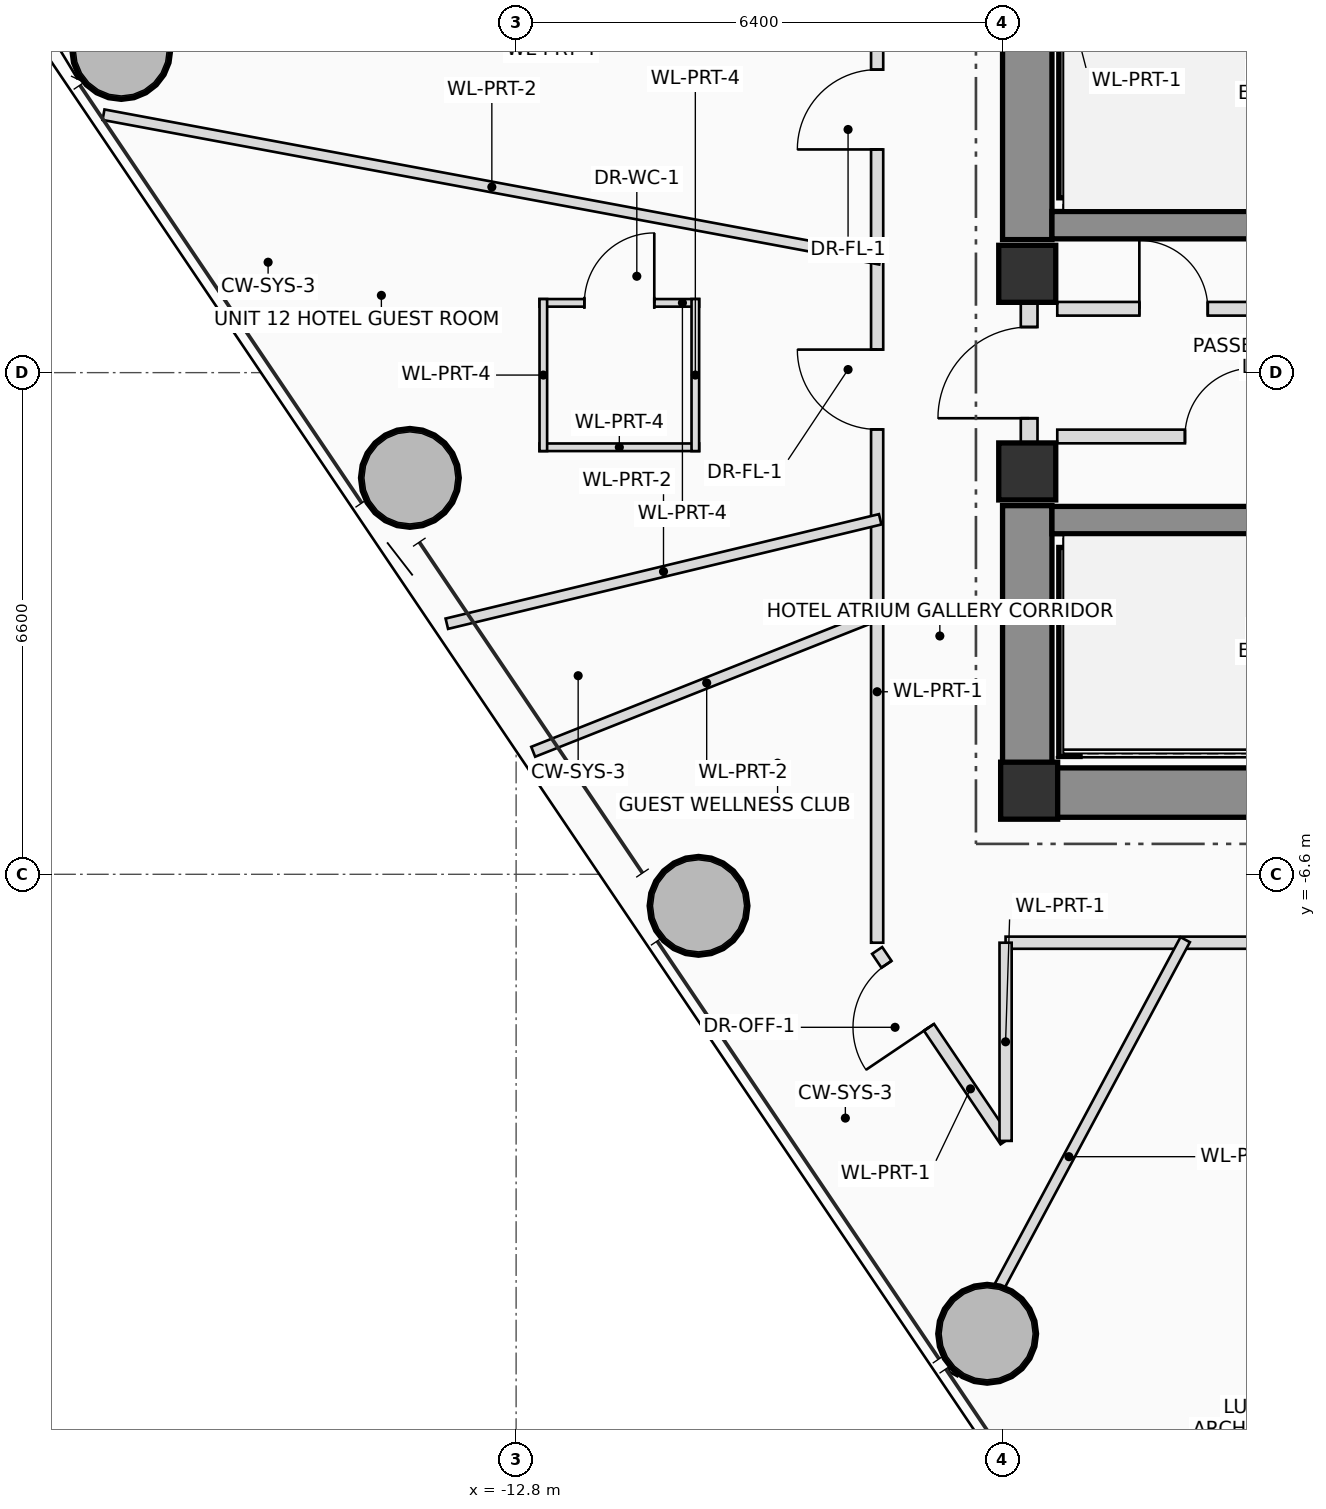
"""IFC4 building model, lengths in metres.
Left out: names, types, materials, properties, quantities, classifications, styles, units other than length and angle.
Written with IfcOpenShell. Run it as: python <this file> out.ifc"""

import sys

from ifc_helpers import new_model, si_unit, direction, frame, frame_2d, origin, origin_2d, place, context, subcontext, project, spatial, rectangle, hollow_circle, extrude, source, transform, mapped, element, fill, save


model = new_model("IFC4")
c1 = context("Model", 3, precision=1e-05, world=origin(), true_north=direction((0.0, 1.0)))
c2 = subcontext(c1, "Body", "Model", "MODEL_VIEW")
j1 = project(units=[si_unit("LENGTHUNIT", "METRE"), si_unit("PLANEANGLEUNIT", "RADIAN")], contexts=[c1])
p1 = place(None, origin())
s1 = spatial("IfcSite", under=j1, at=p1, CompositionType="ELEMENT")
p2 = place(p1, origin())
s2 = spatial("IfcBuilding", under=s1, at=p2, CompositionType="ELEMENT")
p3 = place(p2, frame((0.0, 0.0, 162.2)))
s3 = spatial("IfcBuildingStorey", under=s2, at=p3, CompositionType="ELEMENT", Elevation=162.2)
m1 = source(origin(), c2, "Body", "SweptSolid", [
    extrude(rectangle(XDim=0.75, YDim=0.75, at=origin_2d()), origin(), (0.0, 0.0, 1.0), 3.45),
])
p4 = place(p3, frame((-6.05, -5.5, 0.0), z_axis=(0.0, 0.0, 1.0), x_axis=(1.0, 0.0, 0.0)))
e1 = element("IfcColumn", 1, at=p4, inside=s3, PredefinedType="COLUMN", context=c2, shape_type="MappedRepresentation", body=[
    mapped(m1, transform((0.0, 0.0, 0.0), scale=1.0)),
])
p5 = place(p3, frame((-6.4, -5.525, 0.0), z_axis=(0.0, 0.0, 1.0), x_axis=(1.0, 0.0, 0.0)))
e2 = element("IfcWall", 2, at=p5, inside=s3, PredefinedType="SHEAR", context=c2, shape_type="SweptSolid", body=[
    extrude(rectangle(XDim=12.8, YDim=0.65, at=frame_2d((6.4, 0.0))), origin(), (0.0, 0.0, 1.0), 3.45),
])
p6 = place(p5, frame((8.6, 0.0, 0.0)))
e3 = element("IfcOpeningElement", 3, at=p6, cuts=e2, PredefinedType="OPENING", context=c2, shape_type="SweptSolid", body=[
    extrude(rectangle(XDim=1.2, YDim=2.2, at=frame_2d((0.6, 1.1))), frame((0.0, 0.335, 0.0), z_axis=(0.0, -1.0, 0.0), x_axis=(1.0, 0.0, 0.0)), (0.0, 0.0, 1.0), 0.67),
])
for number, where, z_axis, x_axis in (
    (4, (-6.075, -5.2, 0.0), (0.0, 0.0, 1.0), (0.0, 1.0, 0.0)),
    (5, (-6.075, 1.75, 0.0), (0.0, 0.0, 1.0), (0.0, 1.0, 0.0)),
):
    element("IfcWall", number, at=place(p3, frame(where, z_axis=z_axis, x_axis=x_axis)), inside=s3, PredefinedType="SHEAR", context=c2, shape_type="SweptSolid", body=[
        extrude(rectangle(XDim=3.45, YDim=0.65, at=frame_2d((1.725, 0.0))), origin(), (0.0, 0.0, 1.0), 3.45),
    ])
for number, where, z_axis, x_axis in (
    (6, (-5.75, 1.94, 0.0), (0.0, 0.0, 1.0), (1.0, 0.0, 0.0)),
    (7, (-5.75, -1.94, 0.0), (0.0, 0.0, 1.0), (1.0, 0.0, 0.0)),
):
    element("IfcWall", number, at=place(p3, frame(where, z_axis=z_axis, x_axis=x_axis)), inside=s3, PredefinedType="SHEAR", context=c2, shape_type="SweptSolid", body=[
        extrude(rectangle(XDim=11.5, YDim=0.36, at=frame_2d((5.75, 0.0))), origin(), (0.0, 0.0, 1.0), 3.45),
    ])
for number, where, z_axis, x_axis in (
    (8, (-5.52, 2.3, 0.0), (0.0, 0.0, 1.0), (0.0, 1.0, 0.0)),
    (9, (-5.52, -5.05, 0.0), (0.0, 0.0, 1.0), (0.0, 1.0, 0.0)),
):
    element("IfcWall", number, at=place(p3, frame(where, z_axis=z_axis, x_axis=x_axis)), inside=s3, PredefinedType="SHEAR", context=c2, shape_type="SweptSolid", body=[
        extrude(rectangle(XDim=2.75, YDim=0.28, at=frame_2d((1.375, 0.0))), origin(), (0.0, 0.0, 1.0), 3.45),
    ])
for number, where, z_axis, x_axis in (
    (10, (-6.075, -1.3, 0.0), (0.0, 0.0, 1.0), (1.0, 0.0, 0.0)),
    (11, (-6.075, 1.3, 0.0), (0.0, 0.0, 1.0), (1.0, 0.0, 0.0)),
):
    element("IfcColumn", number, at=place(p3, frame(where, z_axis=z_axis, x_axis=x_axis)), inside=s3, PredefinedType="COLUMN", context=c2, shape_type="MappedRepresentation", body=[
        mapped(m1, transform((0.0, 0.0, 0.0), scale=1.0)),
    ])
m2 = source(origin(), c2, "Body", "SweptSolid", [
    extrude(hollow_circle(Radius=0.65, WallThickness=0.045, at=origin_2d()), origin(), (0.0, 0.0, 1.0), 3.45),
])
for number, where, z_axis, x_axis in (
    (12, (-17.995, 4.245, 0.0), (0.0, 0.0, 1.0), (1.0, 0.0, 0.0)),
    (13, (-14.198, -1.385, 0.0), (0.0, 0.0, 1.0), (1.0, 0.0, 0.0)),
    (14, (-10.4, -7.015, 0.0), (0.0, 0.0, 1.0), (1.0, 0.0, 0.0)),
    (15, (-6.603, -12.645, 0.0), (0.0, 0.0, 1.0), (1.0, 0.0, 0.0)),
):
    element("IfcColumn", number, at=place(p3, frame(where, z_axis=z_axis, x_axis=x_axis)), inside=s3, PredefinedType="COLUMN", context=c2, shape_type="MappedRepresentation", body=[
        mapped(m2, transform((0.0, 0.0, 0.0), scale=1.0)),
    ])
p7 = place(p3, frame((-6.05, -0.95, 0.0), z_axis=(0.0, 0.0, 1.0), x_axis=(0.0, 1.0, 0.0)))
e16 = element("IfcWall", 16, at=p7, inside=s3, PredefinedType="PLUMBINGWALL", context=c2, shape_type="SweptSolid", body=[
    extrude(rectangle(XDim=1.9, YDim=0.22, at=frame_2d((0.95, 0.0))), origin(), (0.0, 0.0, 1.0), 2.23),
])
p8 = place(p7, frame((0.35, 0.0, 0.0)))
e17 = element("IfcOpeningElement", 17, at=p8, cuts=e16, PredefinedType="OPENING", context=c2, shape_type="SweptSolid", body=[
    extrude(rectangle(XDim=1.2, YDim=2.2, at=frame_2d((0.6, 1.1))), frame((0.0, 0.12, 0.0), z_axis=(0.0, -1.0, 0.0), x_axis=(1.0, 0.0, 0.0)), (0.0, 0.0, 1.0), 0.24),
])
p9 = place(p3, frame((-5.68, 0.84, 0.0), z_axis=(0.0, 0.0, 1.0), x_axis=(1.0, 0.0, 0.0)))
e18 = element("IfcWall", 18, at=p9, inside=s3, PredefinedType="PLUMBINGWALL", context=c2, shape_type="SweptSolid", body=[
    extrude(rectangle(XDim=10.26, YDim=0.18, at=frame_2d((5.13, 0.0))), origin(), (0.0, 0.0, 1.0), 3.25),
])
p10 = place(p9, frame((1.08, 0.0, 0.0)))
e19 = element("IfcOpeningElement", 19, at=p10, cuts=e18, PredefinedType="OPENING", context=c2, shape_type="SweptSolid", body=[
    extrude(rectangle(XDim=0.9, YDim=2.05, at=frame_2d((0.45, 1.025))), frame((0.0, 0.1, 0.0), z_axis=(0.0, -1.0, 0.0), x_axis=(1.0, 0.0, 0.0)), (0.0, 0.0, 1.0), 0.2),
])
p11 = place(p9, frame((3.93, 0.0, 0.0)))
e20 = element("IfcOpeningElement", 20, at=p11, cuts=e18, PredefinedType="OPENING", context=c2, shape_type="SweptSolid", body=[
    extrude(rectangle(XDim=1.1, YDim=2.2, at=frame_2d((0.55, 1.1))), frame((0.0, 0.1, 0.0), z_axis=(0.0, -1.0, 0.0), x_axis=(1.0, 0.0, 0.0)), (0.0, 0.0, 1.0), 0.2),
])
p12 = place(p9, frame((5.63, 0.0, 0.0)))
e21 = element("IfcOpeningElement", 21, at=p12, cuts=e18, PredefinedType="OPENING", context=c2, shape_type="SweptSolid", body=[
    extrude(rectangle(XDim=1.1, YDim=2.2, at=frame_2d((0.55, 1.1))), frame((0.0, 0.1, 0.0), z_axis=(0.0, -1.0, 0.0), x_axis=(1.0, 0.0, 0.0)), (0.0, 0.0, 1.0), 0.2),
])
p13 = place(p3, frame((-5.68, -0.84, 0.0), z_axis=(0.0, 0.0, 1.0), x_axis=(1.0, 0.0, 0.0)))
e22 = element("IfcWall", 22, at=p13, inside=s3, PredefinedType="PLUMBINGWALL", context=c2, shape_type="SweptSolid", body=[
    extrude(rectangle(XDim=8.7, YDim=0.18, at=frame_2d((4.35, 0.0))), origin(), (0.0, 0.0, 1.0), 3.25),
])
p14 = place(p13, frame((1.68, 0.0, 0.0)))
e23 = element("IfcOpeningElement", 23, at=p14, cuts=e22, PredefinedType="OPENING", context=c2, shape_type="SweptSolid", body=[
    extrude(rectangle(XDim=0.9, YDim=2.05, at=frame_2d((0.45, 1.025))), frame((0.0, 0.1, 0.0), z_axis=(0.0, -1.0, 0.0), x_axis=(1.0, 0.0, 0.0)), (0.0, 0.0, 1.0), 0.2),
])
p15 = place(p13, frame((3.93, 0.0, 0.0)))
e24 = element("IfcOpeningElement", 24, at=p15, cuts=e22, PredefinedType="OPENING", context=c2, shape_type="SweptSolid", body=[
    extrude(rectangle(XDim=1.1, YDim=2.2, at=frame_2d((0.55, 1.1))), frame((0.0, 0.1, 0.0), z_axis=(0.0, -1.0, 0.0), x_axis=(1.0, 0.0, 0.0)), (0.0, 0.0, 1.0), 0.2),
])
p16 = place(p13, frame((5.63, 0.0, 0.0)))
e25 = element("IfcOpeningElement", 25, at=p16, cuts=e22, PredefinedType="OPENING", context=c2, shape_type="SweptSolid", body=[
    extrude(rectangle(XDim=1.1, YDim=2.2, at=frame_2d((0.55, 1.1))), frame((0.0, 0.1, 0.0), z_axis=(0.0, -1.0, 0.0), x_axis=(1.0, 0.0, 0.0)), (0.0, 0.0, 1.0), 0.2),
])
p17 = place(p3, frame((-12.492, 0.918, 0.0), z_axis=(0.0, 0.0, 1.0), x_axis=(1.0, 0.0, 0.0)))
e26 = element("IfcWall", 26, at=p17, inside=s3, PredefinedType="PARTITIONING", context=c2, shape_type="SweptSolid", body=[
    extrude(rectangle(XDim=2.1, YDim=0.1, at=frame_2d((1.05, 0.0))), origin(), (0.0, 0.0, 1.0), 2.805),
])
p18 = place(p17, frame((0.59, 0.0, 0.0)))
e27 = element("IfcOpeningElement", 27, at=p18, cuts=e26, PredefinedType="OPENING", context=c2, shape_type="SweptSolid", body=[
    extrude(rectangle(XDim=0.92, YDim=2.1, at=frame_2d((0.46, 1.05))), frame((0.0, 0.06, 0.0), z_axis=(0.0, -1.0, 0.0), x_axis=(1.0, 0.0, 0.0)), (0.0, 0.0, 1.0), 0.12),
])
p19 = place(p3, frame((-10.392, -0.982, 0.0), z_axis=(0.0, 0.0, 1.0), x_axis=(-1.0, 0.0, 0.0)))
e28 = element("IfcWall", 28, at=p19, inside=s3, PredefinedType="PARTITIONING", context=c2, shape_type="SweptSolid", body=[
    extrude(rectangle(XDim=2.1, YDim=0.1, at=frame_2d((1.05, 0.0))), origin(), (0.0, 0.0, 1.0), 2.805),
])
for number, where, z_axis, x_axis in (
    (29, (-10.442, 0.968, 0.0), (0.0, 0.0, 1.0), (0.0, -1.0, 0.0)),
    (30, (-12.442, -1.032, 0.0), (0.0, 0.0, 1.0), (0.0, 1.0, 0.0)),
):
    element("IfcWall", number, at=place(p3, frame(where, z_axis=z_axis, x_axis=x_axis)), inside=s3, PredefinedType="PARTITIONING", context=c2, shape_type="SweptSolid", body=[
        extrude(rectangle(XDim=2.0, YDim=0.1, at=frame_2d((1.0, 0.0))), origin(), (0.0, 0.0, 1.0), 3.25),
    ])
p20 = place(p3, frame((-6.36, -10.107, 0.0), z_axis=(0.0, 0.0, 1.0), x_axis=(-0.559166202639, 0.829055581868, 0.0)))
e31 = element("IfcWall", 31, at=p20, inside=s3, PredefinedType="PARTITIONING", context=c2, shape_type="SweptSolid", body=[
    extrude(rectangle(XDim=3.022, YDim=0.16, at=frame_2d((1.511, 0.0))), origin(), (0.0, 0.0, 1.0), 2.605),
])
p21 = place(p20, frame((1.802, 0.0, 0.0)))
e32 = element("IfcOpeningElement", 32, at=p21, cuts=e31, PredefinedType="OPENING", context=c2, shape_type="SweptSolid", body=[
    extrude(rectangle(XDim=1.0, YDim=2.25, at=frame_2d((0.5, 1.125))), frame((0.0, 0.09, 0.0), z_axis=(0.0, -1.0, 0.0), x_axis=(1.0, 0.0, 0.0)), (0.0, 0.0, 1.0), 0.18),
])
p22 = place(p3, frame((-8.05, -7.5, 0.0), z_axis=(0.0, 0.0, 1.0), x_axis=(0.0, 1.0, 0.0)))
e33 = element("IfcWall", 33, at=p22, inside=s3, PredefinedType="PARTITIONING", context=c2, shape_type="SweptSolid", body=[
    extrude(rectangle(XDim=15.0, YDim=0.16, at=frame_2d((7.5, 0.0))), origin(), (0.0, 0.0, 1.0), 2.605),
])
p23 = place(p22, frame((6.753, 0.0, 0.0)))
e34 = element("IfcOpeningElement", 34, at=p23, cuts=e33, PredefinedType="OPENING", context=c2, shape_type="SweptSolid", body=[
    extrude(rectangle(XDim=1.05, YDim=2.2, at=frame_2d((0.525, 1.1))), frame((0.0, 0.09, 0.0), z_axis=(0.0, -1.0, 0.0), x_axis=(1.0, 0.0, 0.0)), (0.0, 0.0, 1.0), 0.18),
])
p24 = place(p22, frame((10.436, 0.0, 0.0)))
e35 = element("IfcOpeningElement", 35, at=p24, cuts=e33, PredefinedType="OPENING", context=c2, shape_type="SweptSolid", body=[
    extrude(rectangle(XDim=1.05, YDim=2.2, at=frame_2d((0.525, 1.1))), frame((0.0, 0.09, 0.0), z_axis=(0.0, -1.0, 0.0), x_axis=(1.0, 0.0, 0.0)), (0.0, 0.0, 1.0), 0.18),
])
p25 = place(p22, frame((13.78, 0.0, 0.0)))
e36 = element("IfcOpeningElement", 36, at=p25, cuts=e33, PredefinedType="OPENING", context=c2, shape_type="SweptSolid", body=[
    extrude(rectangle(XDim=1.0, YDim=2.25, at=frame_2d((0.5, 1.125))), frame((0.0, 0.09, 0.0), z_axis=(0.0, -1.0, 0.0), x_axis=(1.0, 0.0, 0.0)), (0.0, 0.0, 1.0), 0.18),
])
p26 = place(p3, frame((5.25, -7.5, 0.0), z_axis=(0.0, 0.0, 1.0), x_axis=(-1.0, 0.0, 0.0)))
e37 = element("IfcWall", 37, at=p26, inside=s3, PredefinedType="PARTITIONING", context=c2, shape_type="SweptSolid", body=[
    extrude(rectangle(XDim=11.61, YDim=0.16, at=frame_2d((5.805, 0.0))), origin(), (0.0, 0.0, 1.0), 2.605),
])
p27 = place(p26, frame((1.618, 0.0, 0.0)))
e38 = element("IfcOpeningElement", 38, at=p27, cuts=e37, PredefinedType="OPENING", context=c2, shape_type="SweptSolid", body=[
    extrude(rectangle(XDim=1.0, YDim=2.25, at=frame_2d((0.5, 1.125))), frame((0.0, 0.09, 0.0), z_axis=(0.0, -1.0, 0.0), x_axis=(1.0, 0.0, 0.0)), (0.0, 0.0, 1.0), 0.18),
])
p28 = place(p26, frame((6.719, 0.0, 0.0)))
e39 = element("IfcOpeningElement", 39, at=p28, cuts=e37, PredefinedType="OPENING", context=c2, shape_type="SweptSolid", body=[
    extrude(rectangle(XDim=1.0, YDim=2.25, at=frame_2d((0.5, 1.125))), frame((0.0, 0.09, 0.0), z_axis=(0.0, -1.0, 0.0), x_axis=(1.0, 0.0, 0.0)), (0.0, 0.0, 1.0), 0.18),
])
p29 = place(p3, frame((-6.36, -7.5, 0.0), z_axis=(0.0, 0.0, 1.0), x_axis=(0.0, -1.0, 0.0)))
e40 = element("IfcWall", 40, at=p29, inside=s3, PredefinedType="PARTITIONING", context=c2, shape_type="SweptSolid", body=[
    extrude(rectangle(XDim=2.607, YDim=0.16, at=frame_2d((1.304, 0.0))), origin(), (0.0, 0.0, 1.0), 2.605),
])
p30 = place(p3, frame((-8.01, 1.491, 0.0), z_axis=(0.0, 0.0, 1.0), x_axis=(-0.983113838534, 0.182995028575, 0.0)))
e41 = element("IfcWall", 41, at=p30, inside=s3, PredefinedType="PARTITIONING", context=c2, shape_type="SweptSolid", body=[
    extrude(rectangle(XDim=10.394, YDim=0.14, at=frame_2d((5.197, 0.0))), origin(), (0.0, 0.0, 1.0), 2.765),
])
p31 = place(p3, frame((-8.01, -1.93, 0.0), z_axis=(0.0, 0.0, 1.0), x_axis=(-0.972178712373, -0.23424037058, 0.0)))
e42 = element("IfcWall", 42, at=p31, inside=s3, PredefinedType="PARTITIONING", context=c2, shape_type="SweptSolid", body=[
    extrude(rectangle(XDim=5.865, YDim=0.14, at=frame_2d((2.932, 0.0))), origin(), (0.0, 0.0, 1.0), 2.605),
])
p32 = place(p3, frame((-8.01, -3.177, 0.0), z_axis=(0.0, 0.0, 1.0), x_axis=(-0.929545887112, -0.368706446586, 0.0)))
e43 = element("IfcWall", 43, at=p32, inside=s3, PredefinedType="PARTITIONING", context=c2, shape_type="SweptSolid", body=[
    extrude(rectangle(XDim=4.911, YDim=0.14, at=frame_2d((2.456, 0.0))), origin(), (0.0, 0.0, 1.0), 2.605),
])
p33 = place(p3, frame((-3.997, -7.46, 0.0), z_axis=(0.0, 0.0, 1.0), x_axis=(-0.472255924341, -0.881461480681, 0.0)))
e44 = element("IfcWall", 44, at=p33, inside=s3, PredefinedType="PARTITIONING", context=c2, shape_type="SweptSolid", body=[
    extrude(rectangle(XDim=6.478, YDim=0.14, at=frame_2d((3.239, 0.0))), origin(), (0.0, 0.0, 1.0), 2.605),
])
p34 = place(p8, origin())
e45 = element("IfcDoor", 45, at=p34, inside=s3, OperationType="SINGLE_SWING_LEFT", PredefinedType="DOOR", context=c2, shape_type="SweptSolid", body=[
    extrude(rectangle(XDim=1.2, YDim=2.2, at=frame_2d((0.6, 1.1))), frame((0.0, 0.025, 0.0), z_axis=(0.0, -1.0, 0.0), x_axis=(1.0, 0.0, 0.0)), (0.0, 0.0, 1.0), 0.05),
])
fill(e17, e45)
p35 = place(p10, origin())
e46 = element("IfcDoor", 46, at=p35, inside=s3, OperationType="SINGLE_SWING_LEFT", PredefinedType="DOOR", context=c2, shape_type="SweptSolid", body=[
    extrude(rectangle(XDim=0.9, YDim=2.05, at=frame_2d((0.45, 1.025))), frame((0.0, 0.025, 0.0), z_axis=(0.0, -1.0, 0.0), x_axis=(1.0, 0.0, 0.0)), (0.0, 0.0, 1.0), 0.05),
])
fill(e19, e46)
p36 = place(p14, origin())
e47 = element("IfcDoor", 47, at=p36, inside=s3, OperationType="SINGLE_SWING_RIGHT", PredefinedType="DOOR", context=c2, shape_type="SweptSolid", body=[
    extrude(rectangle(XDim=0.9, YDim=2.05, at=frame_2d((0.45, 1.025))), frame((0.0, 0.025, 0.0), z_axis=(0.0, -1.0, 0.0), x_axis=(1.0, 0.0, 0.0)), (0.0, 0.0, 1.0), 0.05),
])
fill(e23, e47)
p37 = place(p18, origin())
e48 = element("IfcDoor", 48, at=p37, inside=s3, OperationType="SINGLE_SWING_RIGHT", PredefinedType="DOOR", context=c2, shape_type="SweptSolid", body=[
    extrude(rectangle(XDim=0.92, YDim=2.1, at=frame_2d((0.46, 1.05))), frame((0.0, 0.025, 0.0), z_axis=(0.0, -1.0, 0.0), x_axis=(1.0, 0.0, 0.0)), (0.0, 0.0, 1.0), 0.05),
])
fill(e27, e48)
p38 = place(p21, origin())
e49 = element("IfcDoor", 49, at=p38, inside=s3, OperationType="SINGLE_SWING_LEFT", PredefinedType="DOOR", context=c2, shape_type="SweptSolid", body=[
    extrude(rectangle(XDim=1.0, YDim=2.25, at=frame_2d((0.5, 1.125))), frame((0.0, 0.025, 0.0), z_axis=(0.0, -1.0, 0.0), x_axis=(1.0, 0.0, 0.0)), (0.0, 0.0, 1.0), 0.05),
])
fill(e32, e49)
p39 = place(p23, origin())
e50 = element("IfcDoor", 50, at=p39, inside=s3, OperationType="SINGLE_SWING_RIGHT", PredefinedType="DOOR", context=c2, shape_type="SweptSolid", body=[
    extrude(rectangle(XDim=1.05, YDim=2.2, at=frame_2d((0.525, 1.1))), frame((0.0, 0.025, 0.0), z_axis=(0.0, -1.0, 0.0), x_axis=(1.0, 0.0, 0.0)), (0.0, 0.0, 1.0), 0.05),
])
fill(e34, e50)
p40 = place(p24, origin())
e51 = element("IfcDoor", 51, at=p40, inside=s3, OperationType="SINGLE_SWING_LEFT", PredefinedType="DOOR", context=c2, shape_type="SweptSolid", body=[
    extrude(rectangle(XDim=1.05, YDim=2.2, at=frame_2d((0.525, 1.1))), frame((0.0, 0.025, 0.0), z_axis=(0.0, -1.0, 0.0), x_axis=(1.0, 0.0, 0.0)), (0.0, 0.0, 1.0), 0.05),
])
fill(e35, e51)
save(model, sys.argv[1])
